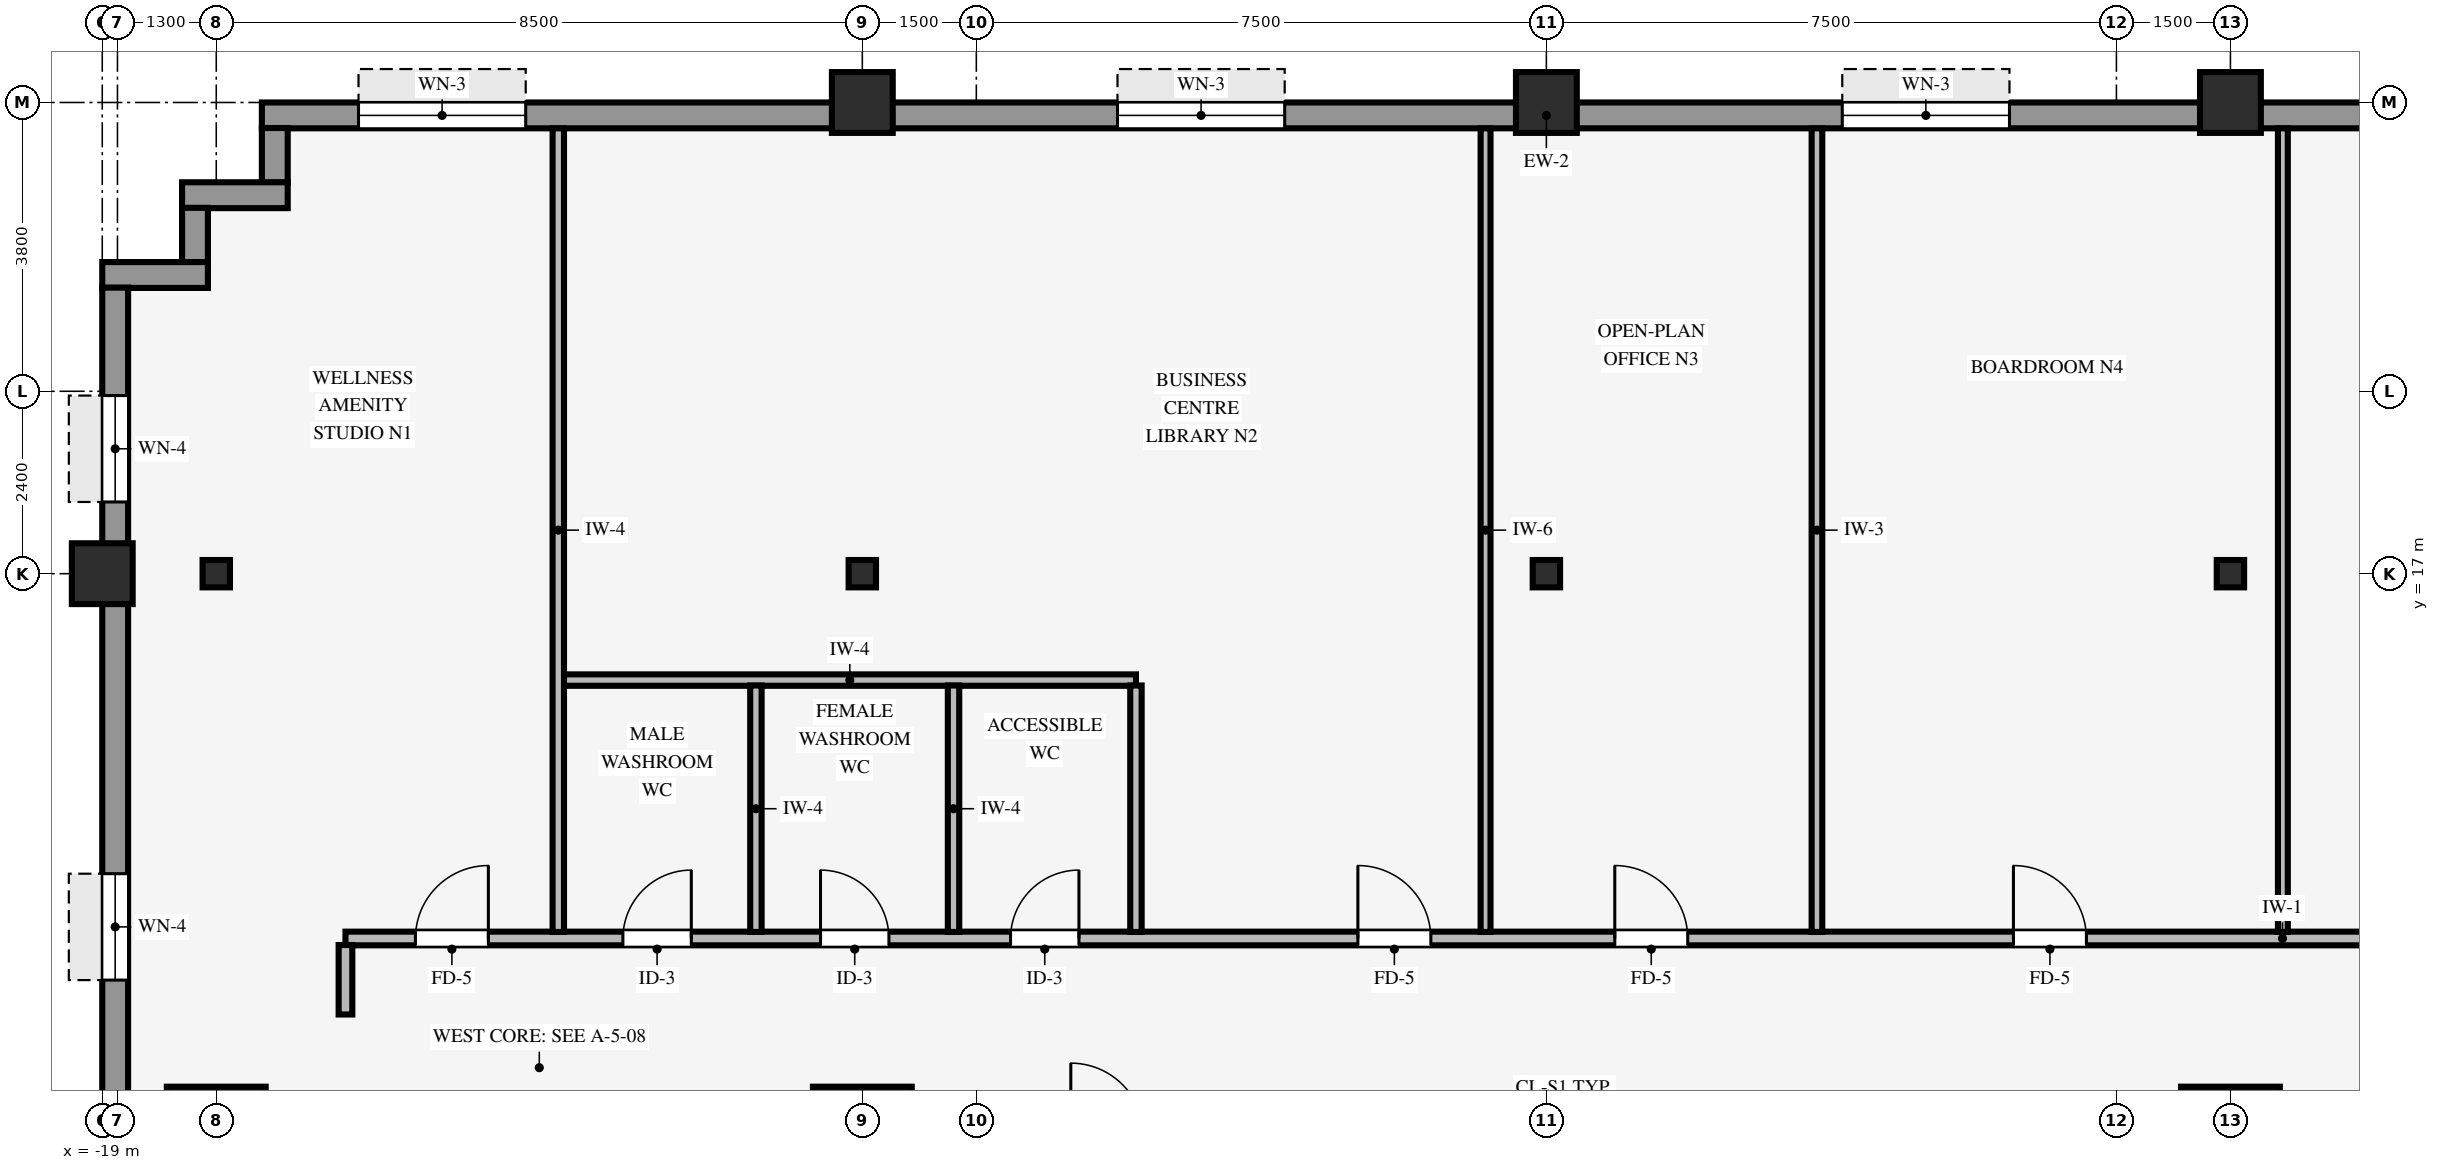
"""IFC4 building model, lengths in metres.
Left out: names, types, materials, properties, quantities, classifications, styles, units other than length and angle.
Written with IfcOpenShell. Run it as: python <this file> out.ifc"""

import sys

from ifc_helpers import new_model, si_unit, direction, frame, frame_2d, origin, origin_2d, place, context, subcontext, project, spatial, rectangle, hollow_rectangle, i_section, extrude, source, transform, mapped, element, fill, save


model = new_model("IFC4")
c1 = context("Model", 3, precision=1e-05, world=origin(), true_north=direction((0.0, 1.0)))
c2 = subcontext(c1, "Body", "Model", "MODEL_VIEW")
j1 = project(units=[si_unit("LENGTHUNIT", "METRE"), si_unit("PLANEANGLEUNIT", "RADIAN")], contexts=[c1])
p1 = place(None, origin())
s1 = spatial("IfcSite", under=j1, at=p1, CompositionType="ELEMENT")
p2 = place(p1, origin())
s2 = spatial("IfcBuilding", under=s1, at=p2, CompositionType="ELEMENT")
p3 = place(p2, frame((0.0, 0.0, 42.2)))
s3 = spatial("IfcBuildingStorey", under=s2, at=p3, CompositionType="ELEMENT", Elevation=42.2)
for number, where, z_axis, x_axis in (
    (1, (-17.5, 9.6, 0.0), (0.0, 0.0, 1.0), (1.0, 0.0, 0.0)),
    (2, (-9.0, 9.6, 0.0), (0.0, 0.0, 1.0), (1.0, 0.0, 0.0)),
    (3, (9.0, 9.6, 0.0), (0.0, 0.0, 1.0), (1.0, 0.0, 0.0)),
):
    element("IfcColumn", number, at=place(p3, frame(where, z_axis=z_axis, x_axis=x_axis)), inside=s3, PredefinedType="COLUMN", context=c2, shape_type="SweptSolid", body=[
        extrude(rectangle(XDim=1.3, YDim=1.3, at=origin_2d()), origin(), (0.0, 0.0, 1.0), 3.37),
    ])
for number, where, z_axis, x_axis in (
    (4, (-19.0, 17.0, 0.0), (0.0, 0.0, 1.0), (1.0, 0.0, 0.0)),
    (5, (-9.0, 23.2, 0.0), (0.0, 0.0, 1.0), (1.0, 0.0, 0.0)),
    (6, (0.0, 23.2, 0.0), (0.0, 0.0, 1.0), (1.0, 0.0, 0.0)),
    (7, (9.0, 23.2, 0.0), (0.0, 0.0, 1.0), (1.0, 0.0, 0.0)),
):
    element("IfcColumn", number, at=place(p3, frame(where, z_axis=z_axis, x_axis=x_axis)), inside=s3, PredefinedType="COLUMN", context=c2, shape_type="SweptSolid", body=[
        extrude(hollow_rectangle(XDim=0.8, YDim=0.8, WallThickness=0.055, InnerFilletRadius=0.055, OuterFilletRadius=0.11, at=origin_2d()), origin(), (0.0, 0.0, 1.0), 3.37),
    ])
for number, where, z_axis, x_axis in (
    (8, (0.0, 17.0, 0.0), (0.0, 0.0, 1.0), (1.0, 0.0, 0.0)),
    (9, (-17.5, 17.0, 0.0), (0.0, 0.0, 1.0), (1.0, 0.0, 0.0)),
    (10, (-9.0, 17.0, 0.0), (0.0, 0.0, 1.0), (1.0, 0.0, 0.0)),
    (11, (9.0, 17.0, 0.0), (0.0, 0.0, 1.0), (1.0, 0.0, 0.0)),
):
    element("IfcColumn", number, at=place(p3, frame(where, z_axis=z_axis, x_axis=x_axis)), inside=s3, PredefinedType="COLUMN", context=c2, shape_type="SweptSolid", body=[
        extrude(i_section(OverallWidth=0.36, OverallDepth=0.36, WebThickness=0.021, FlangeThickness=0.021, FilletRadius=0.018, at=origin_2d()), origin(), (0.0, 0.0, 1.0), 3.37),
    ])
p4 = place(p3, frame((-16.9, 23.03, 0.0), z_axis=(0.0, 0.0, 1.0), x_axis=(1.0, 0.0, 0.0)))
e12 = element("IfcWall", 12, at=p4, inside=s3, PredefinedType="STANDARD", context=c2, shape_type="SweptSolid", body=[
    extrude(rectangle(XDim=33.8, YDim=0.34, at=frame_2d((16.9, 0.0))), origin(), (0.0, 0.0, 1.0), 2.705),
])
p5 = place(p4, frame((1.271, 0.0, 0.8)))
e13 = element("IfcOpeningElement", 13, at=p5, cuts=e12, PredefinedType="OPENING", context=c2, shape_type="SweptSolid", body=[
    extrude(rectangle(XDim=2.2, YDim=1.65, at=frame_2d((1.1, 0.825))), frame((0.0, 0.18, 0.0), z_axis=(0.0, -1.0, 0.0), x_axis=(1.0, 0.0, 0.0)), (0.0, 0.0, 1.0), 0.36),
])
p6 = place(p4, frame((11.257, 0.0, 0.8)))
e14 = element("IfcOpeningElement", 14, at=p6, cuts=e12, PredefinedType="OPENING", context=c2, shape_type="SweptSolid", body=[
    extrude(rectangle(XDim=2.2, YDim=1.65, at=frame_2d((1.1, 0.825))), frame((0.0, 0.18, 0.0), z_axis=(0.0, -1.0, 0.0), x_axis=(1.0, 0.0, 0.0)), (0.0, 0.0, 1.0), 0.36),
])
p7 = place(p4, frame((20.793, 0.0, 0.8)))
e15 = element("IfcOpeningElement", 15, at=p7, cuts=e12, PredefinedType="OPENING", context=c2, shape_type="SweptSolid", body=[
    extrude(rectangle(XDim=2.2, YDim=1.65, at=frame_2d((1.1, 0.825))), frame((0.0, 0.18, 0.0), z_axis=(0.0, -1.0, 0.0), x_axis=(1.0, 0.0, 0.0)), (0.0, 0.0, 1.0), 0.36),
])
p8 = place(p4, frame((29.429, 0.0, 0.8)))
e16 = element("IfcOpeningElement", 16, at=p8, cuts=e12, PredefinedType="OPENING", context=c2, shape_type="SweptSolid", body=[
    extrude(rectangle(XDim=2.2, YDim=1.65, at=frame_2d((1.1, 0.825))), frame((0.0, 0.18, 0.0), z_axis=(0.0, -1.0, 0.0), x_axis=(1.0, 0.0, 0.0)), (0.0, 0.0, 1.0), 0.36),
])
p9 = place(p3, frame((-16.73, 22.146, 0.0), z_axis=(0.0, 0.0, 1.0), x_axis=(0.0, 1.0, 0.0)))
e17 = element("IfcWall", 17, at=p9, inside=s3, PredefinedType="STANDARD", context=c2, shape_type="SweptSolid", body=[
    extrude(rectangle(XDim=0.718, YDim=0.34, at=frame_2d((0.359, 0.0))), origin(), (0.0, 0.0, 1.0), 3.36),
])
p10 = place(p3, frame((-17.95, 21.98, 0.0), z_axis=(0.0, 0.0, 1.0), x_axis=(1.0, 0.0, 0.0)))
e18 = element("IfcWall", 18, at=p10, inside=s3, PredefinedType="STANDARD", context=c2, shape_type="SweptSolid", body=[
    extrude(rectangle(XDim=1.39, YDim=0.34, at=frame_2d((0.695, 0.0))), origin(), (0.0, 0.0, 1.0), 3.36),
])
p11 = place(p3, frame((-17.78, 21.096, 0.0), z_axis=(0.0, 0.0, 1.0), x_axis=(0.0, 1.0, 0.0)))
e19 = element("IfcWall", 19, at=p11, inside=s3, PredefinedType="STANDARD", context=c2, shape_type="SweptSolid", body=[
    extrude(rectangle(XDim=0.718, YDim=0.34, at=frame_2d((0.359, 0.0))), origin(), (0.0, 0.0, 1.0), 3.36),
])
p12 = place(p3, frame((-19.0, 20.93, 0.0), z_axis=(0.0, 0.0, 1.0), x_axis=(1.0, 0.0, 0.0)))
e20 = element("IfcWall", 20, at=p12, inside=s3, PredefinedType="STANDARD", context=c2, shape_type="SweptSolid", body=[
    extrude(rectangle(XDim=1.39, YDim=0.34, at=frame_2d((0.695, 0.0))), origin(), (0.0, 0.0, 1.0), 3.36),
])
p13 = place(p3, frame((-18.83, -20.764, 0.0), z_axis=(0.0, 0.0, 1.0), x_axis=(0.0, 1.0, 0.0)))
e21 = element("IfcWall", 21, at=p13, inside=s3, PredefinedType="STANDARD", context=c2, shape_type="SweptSolid", body=[
    extrude(rectangle(XDim=41.528, YDim=0.34, at=frame_2d((20.764, 0.0))), origin(), (0.0, 0.0, 1.0), 2.705),
])
p14 = place(p13, frame((6.964, 0.0, 0.0)))
e22 = element("IfcOpeningElement", 22, at=p14, cuts=e21, PredefinedType="OPENING", context=c2, shape_type="SweptSolid", body=[
    extrude(rectangle(XDim=0.98, YDim=2.15, at=frame_2d((0.49, 1.075))), frame((0.0, 0.18, 0.0), z_axis=(0.0, -1.0, 0.0), x_axis=(1.0, 0.0, 0.0)), (0.0, 0.0, 1.0), 0.36),
])
p15 = place(p13, frame((1.42, 0.0, 0.8)))
e23 = element("IfcOpeningElement", 23, at=p15, cuts=e21, PredefinedType="OPENING", context=c2, shape_type="SweptSolid", body=[
    extrude(rectangle(XDim=1.4, YDim=1.65, at=frame_2d((0.7, 0.825))), frame((0.0, 0.18, 0.0), z_axis=(0.0, -1.0, 0.0), x_axis=(1.0, 0.0, 0.0)), (0.0, 0.0, 1.0), 0.36),
])
p16 = place(p13, frame((32.417, 0.0, 0.8)))
e24 = element("IfcOpeningElement", 24, at=p16, cuts=e21, PredefinedType="OPENING", context=c2, shape_type="SweptSolid", body=[
    extrude(rectangle(XDim=1.4, YDim=1.65, at=frame_2d((0.7, 0.825))), frame((0.0, 0.18, 0.0), z_axis=(0.0, -1.0, 0.0), x_axis=(1.0, 0.0, 0.0)), (0.0, 0.0, 1.0), 0.36),
])
p17 = place(p13, frame((38.708, 0.0, 0.8)))
e25 = element("IfcOpeningElement", 25, at=p17, cuts=e21, PredefinedType="OPENING", context=c2, shape_type="SweptSolid", body=[
    extrude(rectangle(XDim=1.4, YDim=1.65, at=frame_2d((0.7, 0.825))), frame((0.0, 0.18, 0.0), z_axis=(0.0, -1.0, 0.0), x_axis=(1.0, 0.0, 0.0)), (0.0, 0.0, 1.0), 0.36),
])
p18 = place(p3, frame((-15.8, 12.2, 0.0), z_axis=(0.0, 0.0, 1.0), x_axis=(1.0, 0.0, 0.0)))
e26 = element("IfcWall", 26, at=p18, inside=s3, PredefinedType="PARTITIONING", context=c2, shape_type="SweptSolid", body=[
    extrude(rectangle(XDim=31.6, YDim=0.18, at=frame_2d((15.8, 0.0))), origin(), (0.0, 0.0, 1.0), 3.36),
])
p19 = place(p18, frame((21.945, 0.0, 0.0)))
e27 = element("IfcOpeningElement", 27, at=p19, cuts=e26, PredefinedType="OPENING", context=c2, shape_type="SweptSolid", body=[
    extrude(rectangle(XDim=0.96, YDim=2.1, at=frame_2d((0.48, 1.05))), frame((0.0, 0.1, 0.0), z_axis=(0.0, -1.0, 0.0), x_axis=(1.0, 0.0, 0.0)), (0.0, 0.0, 1.0), 0.2),
])
p20 = place(p18, frame((28.065, 0.0, 0.0)))
e28 = element("IfcOpeningElement", 28, at=p20, cuts=e26, PredefinedType="OPENING", context=c2, shape_type="SweptSolid", body=[
    extrude(rectangle(XDim=0.96, YDim=2.1, at=frame_2d((0.48, 1.05))), frame((0.0, 0.1, 0.0), z_axis=(0.0, -1.0, 0.0), x_axis=(1.0, 0.0, 0.0)), (0.0, 0.0, 1.0), 0.2),
])
p21 = place(p18, frame((16.7, 0.0, 0.0)))
e29 = element("IfcOpeningElement", 29, at=p21, cuts=e26, PredefinedType="OPENING", context=c2, shape_type="SweptSolid", body=[
    extrude(rectangle(XDim=0.96, YDim=2.1, at=frame_2d((0.48, 1.05))), frame((0.0, 0.1, 0.0), z_axis=(0.0, -1.0, 0.0), x_axis=(1.0, 0.0, 0.0)), (0.0, 0.0, 1.0), 0.2),
])
p22 = place(p18, frame((0.92, 0.0, 0.0)))
e30 = element("IfcOpeningElement", 30, at=p22, cuts=e26, PredefinedType="OPENING", context=c2, shape_type="SweptSolid", body=[
    extrude(rectangle(XDim=0.96, YDim=2.1, at=frame_2d((0.48, 1.05))), frame((0.0, 0.1, 0.0), z_axis=(0.0, -1.0, 0.0), x_axis=(1.0, 0.0, 0.0)), (0.0, 0.0, 1.0), 0.2),
])
p23 = place(p18, frame((6.25, 0.0, 0.0)))
e31 = element("IfcOpeningElement", 31, at=p23, cuts=e26, PredefinedType="OPENING", context=c2, shape_type="SweptSolid", body=[
    extrude(rectangle(XDim=0.9, YDim=2.1, at=frame_2d((0.45, 1.05))), frame((0.0, 0.1, 0.0), z_axis=(0.0, -1.0, 0.0), x_axis=(1.0, 0.0, 0.0)), (0.0, 0.0, 1.0), 0.2),
])
p24 = place(p18, frame((3.65, 0.0, 0.0)))
e32 = element("IfcOpeningElement", 32, at=p24, cuts=e26, PredefinedType="OPENING", context=c2, shape_type="SweptSolid", body=[
    extrude(rectangle(XDim=0.9, YDim=2.1, at=frame_2d((0.45, 1.05))), frame((0.0, 0.1, 0.0), z_axis=(0.0, -1.0, 0.0), x_axis=(1.0, 0.0, 0.0)), (0.0, 0.0, 1.0), 0.2),
])
p25 = place(p18, frame((13.32, 0.0, 0.0)))
e33 = element("IfcOpeningElement", 33, at=p25, cuts=e26, PredefinedType="OPENING", context=c2, shape_type="SweptSolid", body=[
    extrude(rectangle(XDim=0.96, YDim=2.1, at=frame_2d((0.48, 1.05))), frame((0.0, 0.1, 0.0), z_axis=(0.0, -1.0, 0.0), x_axis=(1.0, 0.0, 0.0)), (0.0, 0.0, 1.0), 0.2),
])
p26 = place(p18, frame((8.75, 0.0, 0.0)))
e34 = element("IfcOpeningElement", 34, at=p26, cuts=e26, PredefinedType="OPENING", context=c2, shape_type="SweptSolid", body=[
    extrude(rectangle(XDim=0.9, YDim=2.1, at=frame_2d((0.45, 1.05))), frame((0.0, 0.1, 0.0), z_axis=(0.0, -1.0, 0.0), x_axis=(1.0, 0.0, 0.0)), (0.0, 0.0, 1.0), 0.2),
])
p27 = place(p3, frame((-12.929, 15.6, 0.0), z_axis=(0.0, 0.0, 1.0), x_axis=(1.0, 0.0, 0.0)))
e35 = element("IfcWall", 35, at=p27, inside=s3, PredefinedType="PARTITIONING", context=c2, shape_type="SweptSolid", body=[
    extrude(rectangle(XDim=7.529, YDim=0.15, at=frame_2d((3.765, 0.0))), origin(), (0.0, 0.0, 1.0), 3.36),
])
p28 = place(p3, frame((-15.8, 11.2, 0.0), z_axis=(0.0, 0.0, 1.0), x_axis=(0.0, 1.0, 0.0)))
e36 = element("IfcWall", 36, at=p28, inside=s3, PredefinedType="PARTITIONING", context=c2, shape_type="SweptSolid", body=[
    extrude(rectangle(XDim=0.914, YDim=0.18, at=frame_2d((0.457, 0.0))), origin(), (0.0, 0.0, 1.0), 3.36),
])
p29 = place(p3, frame((-13.0, 12.286, 0.0), z_axis=(0.0, 0.0, 1.0), x_axis=(0.0, 1.0, 0.0)))
e37 = element("IfcWall", 37, at=p29, inside=s3, PredefinedType="PARTITIONING", context=c2, shape_type="SweptSolid", body=[
    extrude(rectangle(XDim=10.574, YDim=0.15, at=frame_2d((5.287, 0.0))), origin(), (0.0, 0.0, 1.0), 3.36),
])
for number, where, z_axis, x_axis in (
    (38, (-10.4, 12.286, 0.0), (0.0, 0.0, 1.0), (0.0, 1.0, 0.0)),
    (39, (-7.8, 12.286, 0.0), (0.0, 0.0, 1.0), (0.0, 1.0, 0.0)),
    (40, (-5.4, 12.286, 0.0), (0.0, 0.0, 1.0), (0.0, 1.0, 0.0)),
):
    element("IfcWall", number, at=place(p3, frame(where, z_axis=z_axis, x_axis=x_axis)), inside=s3, PredefinedType="PARTITIONING", context=c2, shape_type="SweptSolid", body=[
        extrude(rectangle(XDim=3.243, YDim=0.15, at=frame_2d((1.622, 0.0))), origin(), (0.0, 0.0, 1.0), 3.36),
    ])
p30 = place(p3, frame((-0.8, 12.286, 0.0), z_axis=(0.0, 0.0, 1.0), x_axis=(0.0, 1.0, 0.0)))
e41 = element("IfcWall", 41, at=p30, inside=s3, PredefinedType="PARTITIONING", context=c2, shape_type="SweptSolid", body=[
    extrude(rectangle(XDim=10.574, YDim=0.13, at=frame_2d((5.287, 0.0))), origin(), (0.0, 0.0, 1.0), 3.36),
])
p31 = place(p3, frame((3.56, 12.286, 0.0), z_axis=(0.0, 0.0, 1.0), x_axis=(0.0, 1.0, 0.0)))
e42 = element("IfcWall", 42, at=p31, inside=s3, PredefinedType="PARTITIONING", context=c2, shape_type="SweptSolid", body=[
    extrude(rectangle(XDim=10.574, YDim=0.14, at=frame_2d((5.287, 0.0))), origin(), (0.0, 0.0, 1.0), 3.36),
])
p32 = place(p3, frame((9.69, 12.286, 0.0), z_axis=(0.0, 0.0, 1.0), x_axis=(0.0, 1.0, 0.0)))
e43 = element("IfcWall", 43, at=p32, inside=s3, PredefinedType="PARTITIONING", context=c2, shape_type="SweptSolid", body=[
    extrude(rectangle(XDim=10.574, YDim=0.13, at=frame_2d((5.287, 0.0))), origin(), (0.0, 0.0, 1.0), 3.36),
])
m1 = source(origin(), c2, "Body", "SweptSolid", [
    extrude(rectangle(XDim=2.2, YDim=1.65, at=frame_2d((1.1, 0.825))), frame((0.0, 0.03, 0.0), z_axis=(0.0, -1.0, 0.0), x_axis=(1.0, 0.0, 0.0)), (0.0, 0.0, 1.0), 0.06),
])
p33 = place(p5, origin())
e44 = element("IfcWindow", 44, at=p33, inside=s3, PartitioningType="SINGLE_PANEL", PredefinedType="WINDOW", context=c2, shape_type="MappedRepresentation", body=[
    mapped(m1, transform((0.0, 0.0, 0.0), scale=1.0)),
])
fill(e13, e44)
p34 = place(p6, origin())
e45 = element("IfcWindow", 45, at=p34, inside=s3, PartitioningType="SINGLE_PANEL", PredefinedType="WINDOW", context=c2, shape_type="MappedRepresentation", body=[
    mapped(m1, transform((0.0, 0.0, 0.0), scale=1.0)),
])
fill(e14, e45)
p35 = place(p7, origin())
e46 = element("IfcWindow", 46, at=p35, inside=s3, PartitioningType="SINGLE_PANEL", PredefinedType="WINDOW", context=c2, shape_type="MappedRepresentation", body=[
    mapped(m1, transform((0.0, 0.0, 0.0), scale=1.0)),
])
fill(e15, e46)
m2 = source(origin(), c2, "Body", "SweptSolid", [
    extrude(rectangle(XDim=1.4, YDim=1.65, at=frame_2d((0.7, 0.825))), frame((0.0, 0.03, 0.0), z_axis=(0.0, -1.0, 0.0), x_axis=(1.0, 0.0, 0.0)), (0.0, 0.0, 1.0), 0.06),
])
p36 = place(p16, origin())
e47 = element("IfcWindow", 47, at=p36, inside=s3, PartitioningType="SINGLE_PANEL", PredefinedType="WINDOW", context=c2, shape_type="MappedRepresentation", body=[
    mapped(m2, transform((0.0, 0.0, 0.0), scale=1.0)),
])
fill(e24, e47)
p37 = place(p17, origin())
e48 = element("IfcWindow", 48, at=p37, inside=s3, PartitioningType="SINGLE_PANEL", PredefinedType="WINDOW", context=c2, shape_type="MappedRepresentation", body=[
    mapped(m2, transform((0.0, 0.0, 0.0), scale=1.0)),
])
fill(e25, e48)
m3 = source(origin(), c2, "Body", "SweptSolid", [
    extrude(rectangle(XDim=0.96, YDim=2.1, at=frame_2d((0.48, 1.05))), frame((0.0, 0.025, 0.0), z_axis=(0.0, -1.0, 0.0), x_axis=(1.0, 0.0, 0.0)), (0.0, 0.0, 1.0), 0.05),
])
p38 = place(p19, origin())
e49 = element("IfcDoor", 49, at=p38, inside=s3, OperationType="SINGLE_SWING_LEFT", PredefinedType="DOOR", context=c2, shape_type="MappedRepresentation", body=[
    mapped(m3, transform((0.0, 0.0, 0.0), scale=1.0)),
])
fill(e27, e49)
p39 = place(p21, origin())
e50 = element("IfcDoor", 50, at=p39, inside=s3, OperationType="SINGLE_SWING_LEFT", PredefinedType="DOOR", context=c2, shape_type="MappedRepresentation", body=[
    mapped(m3, transform((0.0, 0.0, 0.0), scale=1.0)),
])
fill(e29, e50)
p40 = place(p22, origin())
e51 = element("IfcDoor", 51, at=p40, inside=s3, OperationType="SINGLE_SWING_RIGHT", PredefinedType="DOOR", context=c2, shape_type="MappedRepresentation", body=[
    mapped(m3, transform((0.0, 0.0, 0.0), scale=1.0)),
])
fill(e30, e51)
m4 = source(origin(), c2, "Body", "SweptSolid", [
    extrude(rectangle(XDim=0.9, YDim=2.1, at=frame_2d((0.45, 1.05))), frame((0.0, 0.025, 0.0), z_axis=(0.0, -1.0, 0.0), x_axis=(1.0, 0.0, 0.0)), (0.0, 0.0, 1.0), 0.05),
])
p41 = place(p23, origin())
e52 = element("IfcDoor", 52, at=p41, inside=s3, OperationType="SINGLE_SWING_LEFT", PredefinedType="DOOR", context=c2, shape_type="MappedRepresentation", body=[
    mapped(m4, transform((0.0, 0.0, 0.0), scale=1.0)),
])
fill(e31, e52)
p42 = place(p24, origin())
e53 = element("IfcDoor", 53, at=p42, inside=s3, OperationType="SINGLE_SWING_RIGHT", PredefinedType="DOOR", context=c2, shape_type="MappedRepresentation", body=[
    mapped(m4, transform((0.0, 0.0, 0.0), scale=1.0)),
])
fill(e32, e53)
p43 = place(p25, origin())
e54 = element("IfcDoor", 54, at=p43, inside=s3, OperationType="SINGLE_SWING_LEFT", PredefinedType="DOOR", context=c2, shape_type="MappedRepresentation", body=[
    mapped(m3, transform((0.0, 0.0, 0.0), scale=1.0)),
])
fill(e33, e54)
p44 = place(p26, origin())
e55 = element("IfcDoor", 55, at=p44, inside=s3, OperationType="SINGLE_SWING_RIGHT", PredefinedType="DOOR", context=c2, shape_type="MappedRepresentation", body=[
    mapped(m4, transform((0.0, 0.0, 0.0), scale=1.0)),
])
fill(e34, e55)
save(model, sys.argv[1])
